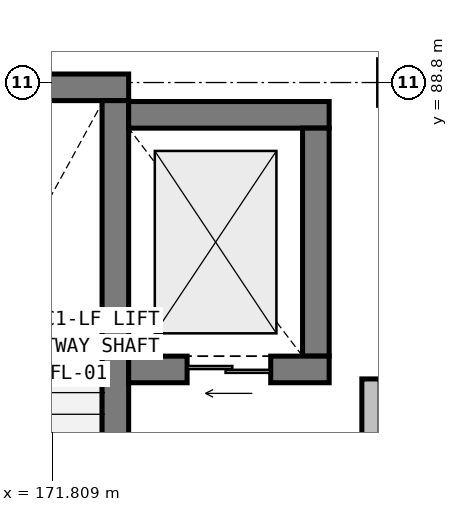
"""IFC4 building model, lengths in metres.
Left out: names, types, materials, properties, quantities, classifications, styles, units other than length and angle.
Written with IfcOpenShell. Run it as: python <this file> out.ifc"""

import sys

from ifc_helpers import new_model, si_unit, direction, frame, frame_2d, origin, origin_2d, place, context, subcontext, project, spatial, rectangle, extrude, element, fill, save


model = new_model("IFC4")
c1 = context("Model", 3, precision=1e-05, world=origin(), true_north=direction((0.0, 1.0)))
c2 = subcontext(c1, "Body", "Model", "MODEL_VIEW")
j1 = project(units=[si_unit("LENGTHUNIT", "METRE"), si_unit("PLANEANGLEUNIT", "RADIAN")], contexts=[c1])
p1 = place(None, origin())
s1 = spatial("IfcSite", under=j1, at=p1, CompositionType="ELEMENT")
p2 = place(p1, origin())
s2 = spatial("IfcBuilding", under=s1, at=p2, CompositionType="ELEMENT")
p3 = place(p2, frame((0.0, 0.0, 22.2)))
s3 = spatial("IfcBuildingStorey", under=s2, at=p3, CompositionType="ELEMENT", Elevation=22.2)
p4 = place(p3, frame((176.4, 88.8, 0.0), z_axis=(0.0, 0.0, 1.0), x_axis=(1.0, 0.0, 0.0)))
e1 = element("IfcColumn", 1, at=p4, inside=s3, PredefinedType="COLUMN", context=c2, shape_type="SweptSolid", body=[
    extrude(rectangle(XDim=0.6, YDim=0.6, at=origin_2d()), origin(), (0.0, 0.0, 1.0), 4.8),
])
p5 = place(p3, frame((168.188, 88.737, 0.0), z_axis=(0.0, 0.0, 1.0), x_axis=(1.0, 0.0, 0.0)))
e2 = element("IfcWall", 2, at=p5, inside=s3, PredefinedType="SHEAR", context=c2, shape_type="SweptSolid", body=[
    extrude(rectangle(XDim=4.624, YDim=0.35, at=frame_2d((2.312, 0.0))), origin(), (0.0, 0.0, 1.0), 4.5),
])
p6 = place(p3, frame((172.637, 88.562, 0.0), z_axis=(0.0, 0.0, 1.0), x_axis=(0.0, -1.0, 0.0)))
e3 = element("IfcWall", 3, at=p6, inside=s3, PredefinedType="SHEAR", context=c2, shape_type="SweptSolid", body=[
    extrude(rectangle(XDim=9.124, YDim=0.35, at=frame_2d((4.562, 0.0))), origin(), (0.0, 0.0, 1.0), 4.5),
])
p7 = place(p3, frame((172.812, 88.375, 0.0), z_axis=(0.0, 0.0, 1.0), x_axis=(1.0, 0.0, 0.0)))
e4 = element("IfcWall", 4, at=p7, inside=s3, PredefinedType="SHEAR", context=c2, shape_type="SweptSolid", body=[
    extrude(rectangle(XDim=2.638, YDim=0.35, at=frame_2d((1.319, 0.0))), origin(), (0.0, 0.0, 1.0), 4.5),
])
p8 = place(p3, frame((175.275, 88.2, 0.0), z_axis=(0.0, 0.0, 1.0), x_axis=(0.0, -1.0, 0.0)))
e5 = element("IfcWall", 5, at=p8, inside=s3, PredefinedType="SHEAR", context=c2, shape_type="SweptSolid", body=[
    extrude(rectangle(XDim=3.0, YDim=0.35, at=frame_2d((1.5, 0.0))), origin(), (0.0, 0.0, 1.0), 4.5),
])
p9 = place(p3, frame((175.45, 85.025, 0.0), z_axis=(0.0, 0.0, 1.0), x_axis=(-1.0, 0.0, 0.0)))
e6 = element("IfcWall", 6, at=p9, inside=s3, PredefinedType="SHEAR", context=c2, shape_type="SweptSolid", body=[
    extrude(rectangle(XDim=2.638, YDim=0.35, at=frame_2d((1.319, 0.0))), origin(), (0.0, 0.0, 1.0), 4.5),
])
p10 = place(p9, frame((0.769, 0.0, 0.0)))
e7 = element("IfcOpeningElement", 7, at=p10, cuts=e6, PredefinedType="OPENING", context=c2, shape_type="SweptSolid", body=[
    extrude(rectangle(XDim=1.1, YDim=2.2, at=frame_2d((0.55, 1.1))), frame((0.0, 0.185, 0.0), z_axis=(0.0, -1.0, 0.0), x_axis=(1.0, 0.0, 0.0)), (0.0, 0.0, 1.0), 0.37),
])
p11 = place(p3, frame((176.0, 84.9, 0.0), z_axis=(0.0, 0.0, 1.0), x_axis=(0.0, -1.0, 0.0)))
e8 = element("IfcWall", 8, at=p11, inside=s3, PredefinedType="PARTITIONING", context=c2, shape_type="SweptSolid", body=[
    extrude(rectangle(XDim=5.5, YDim=0.24, at=frame_2d((2.75, 0.0))), origin(), (0.0, 0.0, 1.0), 3.825),
])
p12 = place(p10, origin())
e9 = element("IfcDoor", 9, at=p12, inside=s3, OperationType="DOUBLE_DOOR_SLIDING", PredefinedType="DOOR", context=c2, shape_type="SweptSolid", body=[
    extrude(rectangle(XDim=1.1, YDim=2.2, at=frame_2d((0.55, 1.1))), frame((0.0, 0.025, 0.0), z_axis=(0.0, -1.0, 0.0), x_axis=(1.0, 0.0, 0.0)), (0.0, 0.0, 1.0), 0.05),
])
fill(e7, e9)
save(model, sys.argv[1])
